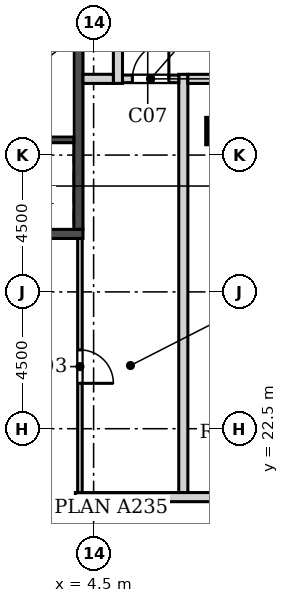
"""IFC4 building model, lengths in metres.
Left out: names, types, materials, properties, quantities, classifications, styles, units other than length and angle.
Written with IfcOpenShell. Run it as: python <this file> out.ifc"""

import sys

from ifc_helpers import new_model, si_unit, direction, frame, frame_2d, origin, origin_2d, place, context, subcontext, project, spatial, rectangle, extrude, element, fill, save


model = new_model("IFC4")
c1 = context("Model", 3, precision=1e-05, world=origin(), true_north=direction((0.0, 1.0)))
c2 = subcontext(c1, "Body", "Model", "MODEL_VIEW")
j1 = project(units=[si_unit("LENGTHUNIT", "METRE"), si_unit("PLANEANGLEUNIT", "RADIAN")], contexts=[c1])
p1 = place(None, origin())
s1 = spatial("IfcSite", under=j1, at=p1, CompositionType="ELEMENT")
p2 = place(p1, origin())
s2 = spatial("IfcBuilding", under=s1, at=p2, CompositionType="ELEMENT")
p3 = place(p2, frame((0.0, 0.0, 304.5)))
s3 = spatial("IfcBuildingStorey", under=s2, at=p3, CompositionType="ELEMENT", Elevation=304.5)
p4 = place(p3, frame((8.637, 32.291, 0.0), z_axis=(0.0, 0.0, 1.0), x_axis=(1.0, 0.0, 0.0)))
e1 = element("IfcColumn", 1, at=p4, inside=s3, PredefinedType="COLUMN", context=c2, shape_type="SweptSolid", body=[
    extrude(rectangle(XDim=0.8, YDim=0.8, at=origin_2d()), origin(), (0.0, 0.0, 1.0), 5.4),
])
p5 = place(p3, frame((24.905, 7.709, 0.0), z_axis=(0.0, 0.0, 1.0), x_axis=(-0.50000128873, 0.866024659735, 0.0)))
e2 = element("IfcWall", 2, at=p5, inside=s3, PredefinedType="SOLIDWALL", context=c2, shape_type="SweptSolid", body=[
    extrude(rectangle(XDim=41.104, YDim=0.34, at=frame_2d((20.552, 0.0))), origin(), (0.0, 0.0, 1.0), 5.0),
])
p6 = place(p5, frame((3.776, 0.0, 0.9)))
e3 = element("IfcOpeningElement", 3, at=p6, cuts=e2, PredefinedType="OPENING", context=c2, shape_type="SweptSolid", body=[
    extrude(rectangle(XDim=1.885, YDim=3.0, at=frame_2d((0.942, 1.5))), frame((0.0, 0.18, 0.0), z_axis=(0.0, -1.0, 0.0), x_axis=(1.0, 0.0, 0.0)), (0.0, 0.0, 1.0), 0.36),
])
p7 = place(p5, frame((6.776, 0.0, 0.9)))
e4 = element("IfcOpeningElement", 4, at=p7, cuts=e2, PredefinedType="OPENING", context=c2, shape_type="SweptSolid", body=[
    extrude(rectangle(XDim=1.885, YDim=3.0, at=frame_2d((0.942, 1.5))), frame((0.0, 0.18, 0.0), z_axis=(0.0, -1.0, 0.0), x_axis=(1.0, 0.0, 0.0)), (0.0, 0.0, 1.0), 0.36),
])
p8 = place(p5, frame((9.776, 0.0, 0.9)))
e5 = element("IfcOpeningElement", 5, at=p8, cuts=e2, PredefinedType="OPENING", context=c2, shape_type="SweptSolid", body=[
    extrude(rectangle(XDim=1.885, YDim=3.0, at=frame_2d((0.942, 1.5))), frame((0.0, 0.18, 0.0), z_axis=(0.0, -1.0, 0.0), x_axis=(1.0, 0.0, 0.0)), (0.0, 0.0, 1.0), 0.36),
])
p9 = place(p5, frame((12.776, 0.0, 0.9)))
e6 = element("IfcOpeningElement", 6, at=p9, cuts=e2, PredefinedType="OPENING", context=c2, shape_type="SweptSolid", body=[
    extrude(rectangle(XDim=1.885, YDim=3.0, at=frame_2d((0.942, 1.5))), frame((0.0, 0.18, 0.0), z_axis=(0.0, -1.0, 0.0), x_axis=(1.0, 0.0, 0.0)), (0.0, 0.0, 1.0), 0.36),
])
p10 = place(p5, frame((15.776, 0.0, 0.9)))
e7 = element("IfcOpeningElement", 7, at=p10, cuts=e2, PredefinedType="OPENING", context=c2, shape_type="SweptSolid", body=[
    extrude(rectangle(XDim=1.885, YDim=3.0, at=frame_2d((0.942, 1.5))), frame((0.0, 0.18, 0.0), z_axis=(0.0, -1.0, 0.0), x_axis=(1.0, 0.0, 0.0)), (0.0, 0.0, 1.0), 0.36),
])
p11 = place(p5, frame((18.776, 0.0, 0.9)))
e8 = element("IfcOpeningElement", 8, at=p11, cuts=e2, PredefinedType="OPENING", context=c2, shape_type="SweptSolid", body=[
    extrude(rectangle(XDim=1.885, YDim=3.0, at=frame_2d((0.942, 1.5))), frame((0.0, 0.18, 0.0), z_axis=(0.0, -1.0, 0.0), x_axis=(1.0, 0.0, 0.0)), (0.0, 0.0, 1.0), 0.36),
])
p12 = place(p5, frame((21.776, 0.0, 0.9)))
e9 = element("IfcOpeningElement", 9, at=p12, cuts=e2, PredefinedType="OPENING", context=c2, shape_type="SweptSolid", body=[
    extrude(rectangle(XDim=1.885, YDim=3.0, at=frame_2d((0.942, 1.5))), frame((0.0, 0.18, 0.0), z_axis=(0.0, -1.0, 0.0), x_axis=(1.0, 0.0, 0.0)), (0.0, 0.0, 1.0), 0.36),
])
p13 = place(p5, frame((24.776, 0.0, 0.9)))
e10 = element("IfcOpeningElement", 10, at=p13, cuts=e2, PredefinedType="OPENING", context=c2, shape_type="SweptSolid", body=[
    extrude(rectangle(XDim=1.885, YDim=3.0, at=frame_2d((0.942, 1.5))), frame((0.0, 0.18, 0.0), z_axis=(0.0, -1.0, 0.0), x_axis=(1.0, 0.0, 0.0)), (0.0, 0.0, 1.0), 0.36),
])
p14 = place(p5, frame((27.776, 0.0, 0.9)))
e11 = element("IfcOpeningElement", 11, at=p14, cuts=e2, PredefinedType="OPENING", context=c2, shape_type="SweptSolid", body=[
    extrude(rectangle(XDim=1.885, YDim=3.0, at=frame_2d((0.942, 1.5))), frame((0.0, 0.18, 0.0), z_axis=(0.0, -1.0, 0.0), x_axis=(1.0, 0.0, 0.0)), (0.0, 0.0, 1.0), 0.36),
])
p15 = place(p5, frame((30.776, 0.0, 0.9)))
e12 = element("IfcOpeningElement", 12, at=p15, cuts=e2, PredefinedType="OPENING", context=c2, shape_type="SweptSolid", body=[
    extrude(rectangle(XDim=1.885, YDim=3.0, at=frame_2d((0.942, 1.5))), frame((0.0, 0.18, 0.0), z_axis=(0.0, -1.0, 0.0), x_axis=(1.0, 0.0, 0.0)), (0.0, 0.0, 1.0), 0.36),
])
p16 = place(p5, frame((33.776, 0.0, 0.9)))
e13 = element("IfcOpeningElement", 13, at=p16, cuts=e2, PredefinedType="OPENING", context=c2, shape_type="SweptSolid", body=[
    extrude(rectangle(XDim=1.885, YDim=3.0, at=frame_2d((0.942, 1.5))), frame((0.0, 0.18, 0.0), z_axis=(0.0, -1.0, 0.0), x_axis=(1.0, 0.0, 0.0)), (0.0, 0.0, 1.0), 0.36),
])
p17 = place(p5, frame((36.776, 0.0, 0.9)))
e14 = element("IfcOpeningElement", 14, at=p17, cuts=e2, PredefinedType="OPENING", context=c2, shape_type="SweptSolid", body=[
    extrude(rectangle(XDim=1.885, YDim=3.0, at=frame_2d((0.942, 1.5))), frame((0.0, 0.18, 0.0), z_axis=(0.0, -1.0, 0.0), x_axis=(1.0, 0.0, 0.0)), (0.0, 0.0, 1.0), 0.36),
])
p18 = place(p3, frame((-4.15, 28.907, -0.4), z_axis=(0.0, 0.0, 1.0), x_axis=(1.0, 0.0, 0.0)))
e15 = element("IfcWall", 15, at=p18, inside=s3, PredefinedType="SOLIDWALL", context=c2, shape_type="SweptSolid", body=[
    extrude(rectangle(XDim=8.3, YDim=0.3, at=frame_2d((4.15, 0.0))), origin(), (0.0, 0.0, 1.0), 5.4),
])
p19 = place(p18, frame((1.55, 0.0, 0.4)))
e16 = element("IfcOpeningElement", 16, at=p19, cuts=e15, PredefinedType="OPENING", context=c2, shape_type="SweptSolid", body=[
    extrude(rectangle(XDim=1.2, YDim=2.1, at=frame_2d((0.6, 1.05))), frame((0.0, 0.16, 0.0), z_axis=(0.0, -1.0, 0.0), x_axis=(1.0, 0.0, 0.0)), (0.0, 0.0, 1.0), 0.32),
])
p20 = place(p3, frame((4.0, 29.057, -0.4), z_axis=(0.0, 0.0, 1.0), x_axis=(0.0, 1.0, 0.0)))
e17 = element("IfcWall", 17, at=p20, inside=s3, PredefinedType="SOLIDWALL", context=c2, shape_type="SweptSolid", body=[
    extrude(rectangle(XDim=6.5, YDim=0.3, at=frame_2d((3.25, 0.0))), origin(), (0.0, 0.0, 1.0), 5.4),
])
p21 = place(p3, frame((-3.85, 32.007, -0.4), z_axis=(0.0, 0.0, 1.0), x_axis=(1.0, 0.0, 0.0)))
e18 = element("IfcWall", 18, at=p21, inside=s3, PredefinedType="SOLIDWALL", context=c2, shape_type="SweptSolid", body=[
    extrude(rectangle(XDim=7.7, YDim=0.2, at=frame_2d((3.85, 0.0))), origin(), (0.0, 0.0, 1.0), 5.4),
])
p22 = place(p21, frame((0.1, 0.0, 0.4)))
e19 = element("IfcOpeningElement", 19, at=p22, cuts=e18, PredefinedType="OPENING", context=c2, shape_type="SweptSolid", body=[
    extrude(rectangle(XDim=1.2, YDim=2.1, at=frame_2d((0.6, 1.05))), frame((0.0, 0.11, 0.0), z_axis=(0.0, -1.0, 0.0), x_axis=(1.0, 0.0, 0.0)), (0.0, 0.0, 1.0), 0.22),
])
p23 = place(p3, frame((7.45, 34.156, 0.0), z_axis=(0.0, 0.0, 1.0), x_axis=(0.0, -1.0, 0.0)))
e20 = element("IfcWall", 20, at=p23, inside=s3, PredefinedType="SOLIDWALL", context=c2, shape_type="SweptSolid", body=[
    extrude(rectangle(XDim=13.757, YDim=0.3, at=frame_2d((6.878, 0.0))), origin(), (0.0, 0.0, 1.0), 5.0),
])
p24 = place(p3, frame((4.05, 28.757, 0.0), z_axis=(0.0, 0.0, 1.0), x_axis=(0.0, -1.0, 0.0)))
e21 = element("IfcWall", 21, at=p24, inside=s3, PredefinedType="PARTITIONING", context=c2, shape_type="SweptSolid", body=[
    extrude(rectangle(XDim=8.357, YDim=0.15, at=frame_2d((4.179, 0.0))), origin(), (0.0, 0.0, 1.0), 5.0),
])
p25 = place(p24, frame((3.664, 0.0, 0.0)))
e22 = element("IfcOpeningElement", 22, at=p25, cuts=e21, PredefinedType="OPENING", context=c2, shape_type="SweptSolid", body=[
    extrude(rectangle(XDim=1.1, YDim=2.1, at=frame_2d((0.55, 1.05))), frame((0.0, 0.085, 0.0), z_axis=(0.0, -1.0, 0.0), x_axis=(1.0, 0.0, 0.0)), (0.0, 0.0, 1.0), 0.17),
])
p26 = place(p3, frame((5.3, 41.066, 0.0), z_axis=(0.0, 0.0, 1.0), x_axis=(0.0, -1.0, 0.0)))
e23 = element("IfcWall", 23, at=p26, inside=s3, PredefinedType="SOLIDWALL", context=c2, shape_type="SweptSolid", body=[
    extrude(rectangle(XDim=7.209, YDim=0.3, at=frame_2d((3.604, 0.0))), origin(), (0.0, 0.0, 1.0), 5.0),
])
p27 = place(p3, frame((3.9, 20.25, 0.0), z_axis=(0.0, 0.0, 1.0), x_axis=(1.0, 0.0, 0.0)))
e24 = element("IfcWall", 24, at=p27, inside=s3, PredefinedType="SOLIDWALL", context=c2, shape_type="SweptSolid", body=[
    extrude(rectangle(XDim=6.382, YDim=0.3, at=frame_2d((3.191, 0.0))), origin(), (0.0, 0.0, 1.0), 5.0),
])
p28 = place(p3, frame((5.45, 34.007, 0.0), z_axis=(0.0, 0.0, 1.0), x_axis=(1.0, 0.0, 0.0)))
e25 = element("IfcWall", 25, at=p28, inside=s3, PredefinedType="SOLIDWALL", context=c2, shape_type="SweptSolid", body=[
    extrude(rectangle(XDim=1.85, YDim=0.25, at=frame_2d((0.925, 0.0))), origin(), (0.0, 0.0, 1.0), 5.0),
])
p29 = place(p28, frame((0.325, 0.0, 0.0)))
e26 = element("IfcOpeningElement", 26, at=p29, cuts=e25, PredefinedType="OPENING", context=c2, shape_type="SweptSolid", body=[
    extrude(rectangle(XDim=1.2, YDim=2.1, at=frame_2d((0.6, 1.05))), frame((0.0, 0.135, 0.0), z_axis=(0.0, -1.0, 0.0), x_axis=(1.0, 0.0, 0.0)), (0.0, 0.0, 1.0), 0.27),
])
p30 = place(p3, frame((9.44, 34.006, 0.0), z_axis=(0.0, 0.0, 1.0), x_axis=(-1.0, 0.0, 0.0)))
e27 = element("IfcWall", 27, at=p30, inside=s3, PredefinedType="SOLIDWALL", context=c2, shape_type="SweptSolid", body=[
    extrude(rectangle(XDim=1.84, YDim=0.3, at=frame_2d((0.92, 0.0))), origin(), (0.0, 0.0, 1.0), 5.0),
])
p31 = place(p3, frame((4.15, 34.007, 0.0), z_axis=(0.0, 0.0, 1.0), x_axis=(1.0, 0.0, 0.0)))
e28 = element("IfcWall", 28, at=p31, inside=s3, PredefinedType="SOLIDWALL", context=c2, shape_type="SweptSolid", body=[
    extrude(rectangle(XDim=1.0, YDim=0.3, at=frame_2d((0.5, 0.0))), origin(), (0.0, 0.0, 1.0), 5.0),
])
p32 = place(p25, origin())
e29 = element("IfcDoor", 29, at=p32, inside=s3, OperationType="SINGLE_SWING_RIGHT", PredefinedType="DOOR", context=c2, shape_type="SweptSolid", body=[
    extrude(rectangle(XDim=1.1, YDim=2.1, at=frame_2d((0.55, 1.05))), frame((0.0, 0.025, 0.0), z_axis=(0.0, -1.0, 0.0), x_axis=(1.0, 0.0, 0.0)), (0.0, 0.0, 1.0), 0.05),
])
fill(e22, e29)
p33 = place(p29, origin())
e30 = element("IfcDoor", 30, at=p33, inside=s3, OperationType="SINGLE_SWING_RIGHT", PredefinedType="DOOR", context=c2, shape_type="SweptSolid", body=[
    extrude(rectangle(XDim=1.2, YDim=2.1, at=frame_2d((0.6, 1.05))), frame((0.0, 0.025, 0.0), z_axis=(0.0, -1.0, 0.0), x_axis=(1.0, 0.0, 0.0)), (0.0, 0.0, 1.0), 0.05),
])
fill(e26, e30)
save(model, sys.argv[1])
